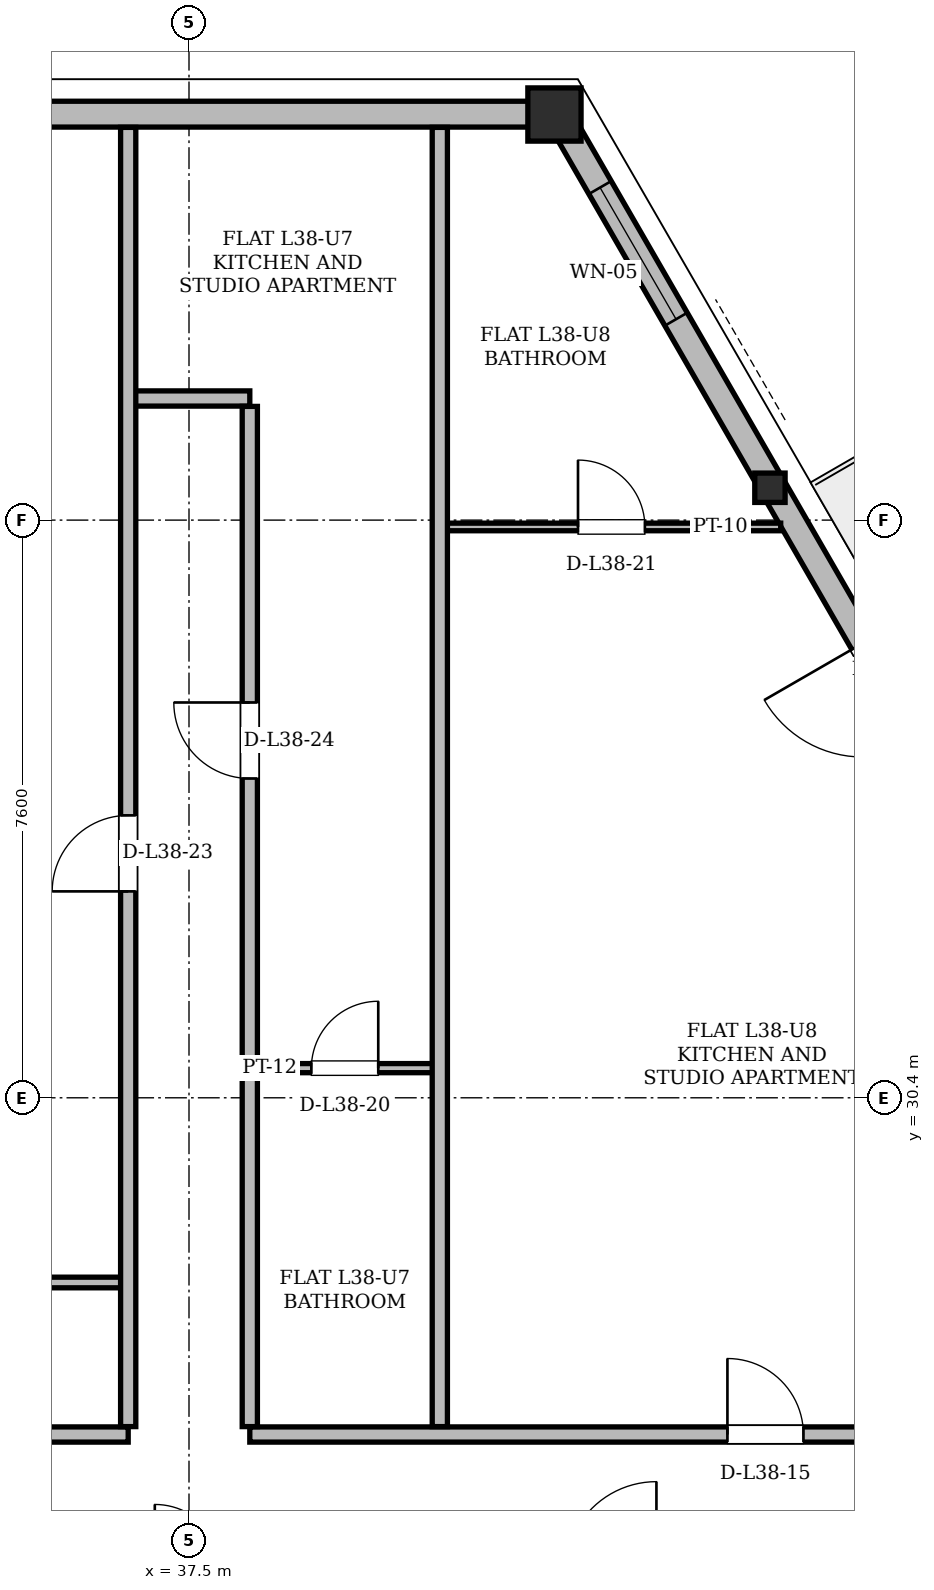
"""IFC4 building model, lengths in metres.
Left out: names, types, materials, properties, quantities, classifications, styles, units other than length and angle.
Written with IfcOpenShell. Run it as: python <this file> out.ifc"""

import sys

from ifc_helpers import new_model, si_unit, direction, frame, frame_2d, origin, origin_2d, place, context, subcontext, project, spatial, rectangle, hollow_rectangle, i_section, extrude, element, fill, save


model = new_model("IFC4")
c1 = context("Model", 3, precision=1e-05, world=origin(), true_north=direction((0.0, 1.0)))
c2 = subcontext(c1, "Body", "Model", "MODEL_VIEW")
j1 = project(units=[si_unit("LENGTHUNIT", "METRE"), si_unit("PLANEANGLEUNIT", "RADIAN")], contexts=[c1])
p1 = place(None, origin())
s1 = spatial("IfcSite", under=j1, at=p1, CompositionType="ELEMENT")
p2 = place(p1, origin())
s2 = spatial("IfcBuilding", under=s1, at=p2, CompositionType="ELEMENT")
p3 = place(p2, frame((0.0, 0.0, 145.8)))
s3 = spatial("IfcBuildingStorey", under=s2, at=p3, CompositionType="ELEMENT", Elevation=145.8)
p4 = place(p3, frame((42.351, 43.341, 0.004), z_axis=(-0.023516425185, -0.002650695324, 0.999719936563), x_axis=(0.11200747743, -0.993707363865, 0.0)))
e1 = element("IfcColumn", 1, at=p4, inside=s3, PredefinedType="COLUMN", context=c2, shape_type="SweptSolid", body=[
    extrude(hollow_rectangle(XDim=0.7, YDim=0.7, WallThickness=0.055, at=origin_2d()), origin(), (0.0, 0.0, 1.0), 3.592),
])
p5 = place(p3, frame((45.183, 38.435, 0.004), z_axis=(-0.022089621745, -0.005233541152, 0.999742296123), x_axis=(0.230540988759, -0.973062614893, 0.0)))
e2 = element("IfcColumn", 2, at=p5, inside=s3, PredefinedType="COLUMN", context=c2, shape_type="SweptSolid", body=[
    extrude(i_section(OverallWidth=0.399, OverallDepth=0.386, WebThickness=0.021, FlangeThickness=0.033, at=origin_2d()), origin(), (0.0, 0.0, 1.0), 3.592),
])
p6 = place(p3, frame((60.052, 12.68, 0.0), z_axis=(0.0, 0.0, 1.0), x_axis=(-0.500002412417, 0.86602401097, 0.0)))
e3 = element("IfcWall", 3, at=p6, inside=s3, PredefinedType="SOLIDWALL", context=c2, shape_type="SweptSolid", body=[
    extrude(rectangle(XDim=35.404, YDim=0.34, at=frame_2d((17.702, 0.0))), origin(), (0.0, 0.0, 1.0), 2.6),
])
p7 = place(p6, frame((6.579, 0.0, 0.0)))
e4 = element("IfcOpeningElement", 4, at=p7, cuts=e3, PredefinedType="OPENING", context=c2, shape_type="SweptSolid", body=[
    extrude(rectangle(XDim=1.5, YDim=2.2, at=frame_2d((0.75, 1.1))), frame((0.0, 0.17, 0.0), z_axis=(0.0, -1.0, 0.0), x_axis=(1.0, 0.0, 0.0)), (0.0, 0.0, 1.0), 0.34),
])
p8 = place(p6, frame((25.869, 0.0, 0.0)))
e5 = element("IfcOpeningElement", 5, at=p8, cuts=e3, PredefinedType="OPENING", context=c2, shape_type="SweptSolid", body=[
    extrude(rectangle(XDim=1.5, YDim=2.2, at=frame_2d((0.75, 1.1))), frame((0.0, 0.17, 0.0), z_axis=(0.0, -1.0, 0.0), x_axis=(1.0, 0.0, 0.0)), (0.0, 0.0, 1.0), 0.34),
])
p9 = place(p6, frame((3.702, 0.0, 0.85)))
e6 = element("IfcOpeningElement", 6, at=p9, cuts=e3, PredefinedType="OPENING", context=c2, shape_type="SweptSolid", body=[
    extrude(rectangle(XDim=1.2, YDim=1.48, at=frame_2d((0.6, 0.74))), frame((0.0, 0.17, 0.0), z_axis=(0.0, -1.0, 0.0), x_axis=(1.0, 0.0, 0.0)), (0.0, 0.0, 1.0), 0.34),
])
p10 = place(p6, frame((11.88, 0.0, 0.85)))
e7 = element("IfcOpeningElement", 7, at=p10, cuts=e3, PredefinedType="OPENING", context=c2, shape_type="SweptSolid", body=[
    extrude(rectangle(XDim=1.2, YDim=1.48, at=frame_2d((0.6, 0.74))), frame((0.0, 0.17, 0.0), z_axis=(0.0, -1.0, 0.0), x_axis=(1.0, 0.0, 0.0)), (0.0, 0.0, 1.0), 0.34),
])
p11 = place(p6, frame((15.346, 0.0, 0.85)))
e8 = element("IfcOpeningElement", 8, at=p11, cuts=e3, PredefinedType="OPENING", context=c2, shape_type="SweptSolid", body=[
    extrude(rectangle(XDim=2.8, YDim=1.64, at=frame_2d((1.4, 0.82))), frame((0.0, 0.17, 0.0), z_axis=(0.0, -1.0, 0.0), x_axis=(1.0, 0.0, 0.0)), (0.0, 0.0, 1.0), 0.34),
])
p12 = place(p6, frame((32.288, 0.0, 0.85)))
e9 = element("IfcOpeningElement", 9, at=p12, cuts=e3, PredefinedType="OPENING", context=c2, shape_type="SweptSolid", body=[
    extrude(rectangle(XDim=2.0, YDim=1.64, at=frame_2d((1.0, 0.82))), frame((0.0, 0.17, 0.0), z_axis=(0.0, -1.0, 0.0), x_axis=(1.0, 0.0, 0.0)), (0.0, 0.0, 1.0), 0.34),
])
p13 = place(p3, frame((42.351, 43.341, 0.0), z_axis=(0.0, 0.0, 1.0), x_axis=(-1.0, 0.0, 0.0)))
e10 = element("IfcWall", 10, at=p13, inside=s3, PredefinedType="SOLIDWALL", context=c2, shape_type="SweptSolid", body=[
    extrude(rectangle(XDim=9.701, YDim=0.34, at=frame_2d((4.851, 0.0))), origin(), (0.0, 0.0, 1.0), 2.6),
])
p14 = place(p3, frame((27.55, 25.97, 0.0), z_axis=(0.0, 0.0, 1.0), x_axis=(1.0, 0.0, 0.0)))
e11 = element("IfcWall", 11, at=p14, inside=s3, PredefinedType="PARTITIONING", context=c2, shape_type="SweptSolid", body=[
    extrude(rectangle(XDim=9.15, YDim=0.2, at=frame_2d((4.575, 0.0))), origin(), (0.0, 0.0, 1.0), 2.842),
])
p15 = place(p3, frame((38.3, 25.97, 0.0), z_axis=(0.0, 0.0, 1.0), x_axis=(1.0, 0.0, 0.0)))
e12 = element("IfcWall", 12, at=p15, inside=s3, PredefinedType="PARTITIONING", context=c2, shape_type="SweptSolid", body=[
    extrude(rectangle(XDim=11.7, YDim=0.2, at=frame_2d((5.85, 0.0))), origin(), (0.0, 0.0, 1.0), 2.842),
])
p16 = place(p15, frame((6.284, 0.0, 0.0)))
e13 = element("IfcOpeningElement", 13, at=p16, cuts=e12, PredefinedType="OPENING", context=c2, shape_type="SweptSolid", body=[
    extrude(rectangle(XDim=1.0, YDim=2.18, at=frame_2d((0.5, 1.09))), frame((0.0, 0.1, 0.0), z_axis=(0.0, -1.0, 0.0), x_axis=(1.0, 0.0, 0.0)), (0.0, 0.0, 1.0), 0.2),
])
p17 = place(p3, frame((23.976, 27.97, 0.0), z_axis=(0.0, 0.0, 1.0), x_axis=(1.0, 0.0, 0.0)))
e14 = element("IfcWall", 14, at=p17, inside=s3, PredefinedType="PARTITIONING", context=c2, shape_type="SweptSolid", body=[
    extrude(rectangle(XDim=12.774, YDim=0.14, at=frame_2d((6.387, 0.0))), origin(), (0.0, 0.0, 1.0), 2.842),
])
p18 = place(p17, frame((0.533, 0.0, 0.0)))
e15 = element("IfcOpeningElement", 15, at=p18, cuts=e14, PredefinedType="OPENING", context=c2, shape_type="SweptSolid", body=[
    extrude(rectangle(XDim=0.88, YDim=2.08, at=frame_2d((0.44, 1.04))), frame((0.0, 0.07, 0.0), z_axis=(0.0, -1.0, 0.0), x_axis=(1.0, 0.0, 0.0)), (0.0, 0.0, 1.0), 0.14),
])
p19 = place(p17, frame((3.054, 0.0, 0.0)))
e16 = element("IfcOpeningElement", 16, at=p19, cuts=e14, PredefinedType="OPENING", context=c2, shape_type="SweptSolid", body=[
    extrude(rectangle(XDim=0.95, YDim=2.1, at=frame_2d((0.475, 1.05))), frame((0.0, 0.07, 0.0), z_axis=(0.0, -1.0, 0.0), x_axis=(1.0, 0.0, 0.0)), (0.0, 0.0, 1.0), 0.14),
])
p20 = place(p17, frame((6.196, 0.0, 0.0)))
e17 = element("IfcOpeningElement", 17, at=p20, cuts=e14, PredefinedType="OPENING", context=c2, shape_type="SweptSolid", body=[
    extrude(rectangle(XDim=0.95, YDim=2.1, at=frame_2d((0.475, 1.05))), frame((0.0, 0.07, 0.0), z_axis=(0.0, -1.0, 0.0), x_axis=(1.0, 0.0, 0.0)), (0.0, 0.0, 1.0), 0.14),
])
p21 = place(p17, frame((10.061, 0.0, 0.0)))
e18 = element("IfcOpeningElement", 18, at=p21, cuts=e14, PredefinedType="OPENING", context=c2, shape_type="SweptSolid", body=[
    extrude(rectangle(XDim=0.92, YDim=2.12, at=frame_2d((0.46, 1.06))), frame((0.0, 0.07, 0.0), z_axis=(0.0, -1.0, 0.0), x_axis=(1.0, 0.0, 0.0)), (0.0, 0.0, 1.0), 0.14),
])
p22 = place(p3, frame((38.218, 30.79, 0.0), z_axis=(0.0, 0.0, 1.0), x_axis=(1.0, 0.0, 0.0)))
e19 = element("IfcWall", 19, at=p22, inside=s3, PredefinedType="PARTITIONING", context=c2, shape_type="SweptSolid", body=[
    extrude(rectangle(XDim=2.664, YDim=0.12, at=frame_2d((1.332, 0.0))), origin(), (0.0, 0.0, 1.0), 3.38),
])
p23 = place(p22, frame((0.892, 0.0, 0.0)))
e20 = element("IfcOpeningElement", 20, at=p23, cuts=e19, PredefinedType="OPENING", context=c2, shape_type="SweptSolid", body=[
    extrude(rectangle(XDim=0.88, YDim=2.08, at=frame_2d((0.44, 1.04))), frame((0.0, 0.06, 0.0), z_axis=(0.0, -1.0, 0.0), x_axis=(1.0, 0.0, 0.0)), (0.0, 0.0, 1.0), 0.12),
])
p24 = place(p3, frame((40.718, 37.91, 0.0), z_axis=(0.0, 0.0, 1.0), x_axis=(1.0, 0.0, 0.0)))
e21 = element("IfcWall", 21, at=p24, inside=s3, PredefinedType="PARTITIONING", context=c2, shape_type="SweptSolid", body=[
    extrude(rectangle(XDim=4.567, YDim=0.1, at=frame_2d((2.284, 0.0))), origin(), (0.0, 0.0, 1.0), 3.38),
])
p25 = place(p24, frame((1.9, 0.0, 0.0)))
e22 = element("IfcOpeningElement", 22, at=p25, cuts=e21, PredefinedType="OPENING", context=c2, shape_type="SweptSolid", body=[
    extrude(rectangle(XDim=0.88, YDim=2.08, at=frame_2d((0.44, 1.04))), frame((0.0, 0.05, 0.0), z_axis=(0.0, -1.0, 0.0), x_axis=(1.0, 0.0, 0.0)), (0.0, 0.0, 1.0), 0.1),
])
p26 = place(p3, frame((36.7, 39.6, 0.0), z_axis=(0.0, 0.0, 1.0), x_axis=(1.0, 0.0, 0.0)))
e23 = element("IfcWall", 23, at=p26, inside=s3, PredefinedType="PARTITIONING", context=c2, shape_type="SweptSolid", body=[
    extrude(rectangle(XDim=1.6, YDim=0.2, at=frame_2d((0.8, 0.0))), origin(), (0.0, 0.0, 1.0), 3.38),
])
p27 = place(p3, frame((36.7, 26.074, 0.0), z_axis=(0.0, 0.0, 1.0), x_axis=(0.0, 1.0, 0.0)))
e24 = element("IfcWall", 24, at=p27, inside=s3, PredefinedType="PARTITIONING", context=c2, shape_type="SweptSolid", body=[
    extrude(rectangle(XDim=17.093, YDim=0.2, at=frame_2d((8.546, 0.0))), origin(), (0.0, 0.0, 1.0), 3.38),
])
p28 = place(p27, frame((7.042, 0.0, 0.0)))
e25 = element("IfcOpeningElement", 25, at=p28, cuts=e24, PredefinedType="OPENING", context=c2, shape_type="SweptSolid", body=[
    extrude(rectangle(XDim=1.0, YDim=2.18, at=frame_2d((0.5, 1.09))), frame((0.0, 0.1, 0.0), z_axis=(0.0, -1.0, 0.0), x_axis=(1.0, 0.0, 0.0)), (0.0, 0.0, 1.0), 0.2),
])
p29 = place(p3, frame((38.3, 26.074, 0.0), z_axis=(0.0, 0.0, 1.0), x_axis=(0.0, 1.0, 0.0)))
e26 = element("IfcWall", 26, at=p29, inside=s3, PredefinedType="PARTITIONING", context=c2, shape_type="SweptSolid", body=[
    extrude(rectangle(XDim=13.422, YDim=0.2, at=frame_2d((6.711, 0.0))), origin(), (0.0, 0.0, 1.0), 3.38),
])
p30 = place(p29, frame((8.527, 0.0, 0.0)))
e27 = element("IfcOpeningElement", 27, at=p30, cuts=e26, PredefinedType="OPENING", context=c2, shape_type="SweptSolid", body=[
    extrude(rectangle(XDim=1.0, YDim=2.18, at=frame_2d((0.5, 1.09))), frame((0.0, 0.1, 0.0), z_axis=(0.0, -1.0, 0.0), x_axis=(1.0, 0.0, 0.0)), (0.0, 0.0, 1.0), 0.2),
])
p31 = place(p3, frame((40.8, 26.074, 0.0), z_axis=(0.0, 0.0, 1.0), x_axis=(0.0, 1.0, 0.0)))
e28 = element("IfcWall", 28, at=p31, inside=s3, PredefinedType="PARTITIONING", context=c2, shape_type="SweptSolid", body=[
    extrude(rectangle(XDim=17.093, YDim=0.2, at=frame_2d((8.546, 0.0))), origin(), (0.0, 0.0, 1.0), 3.38),
])
p32 = place(p12, origin())
e29 = element("IfcWindow", 29, at=p32, inside=s3, PartitioningType="SINGLE_PANEL", PredefinedType="WINDOW", context=c2, shape_type="SweptSolid", body=[
    extrude(rectangle(XDim=2.0, YDim=1.64, at=frame_2d((1.0, 0.82))), frame((0.0, 0.03, 0.0), z_axis=(0.0, -1.0, 0.0), x_axis=(1.0, 0.0, 0.0)), (0.0, 0.0, 1.0), 0.06),
])
fill(e9, e29)
p33 = place(p16, origin())
e30 = element("IfcDoor", 30, at=p33, inside=s3, OperationType="SINGLE_SWING_LEFT", PredefinedType="DOOR", context=c2, shape_type="SweptSolid", body=[
    extrude(rectangle(XDim=1.0, YDim=2.18, at=frame_2d((0.5, 1.09))), frame((0.0, 0.025, 0.0), z_axis=(0.0, -1.0, 0.0), x_axis=(1.0, 0.0, 0.0)), (0.0, 0.0, 1.0), 0.05),
])
fill(e13, e30)
p34 = place(p23, origin())
e31 = element("IfcDoor", 31, at=p34, inside=s3, OperationType="SINGLE_SWING_RIGHT", PredefinedType="DOOR", context=c2, shape_type="SweptSolid", body=[
    extrude(rectangle(XDim=0.88, YDim=2.08, at=frame_2d((0.44, 1.04))), frame((0.0, 0.025, 0.0), z_axis=(0.0, -1.0, 0.0), x_axis=(1.0, 0.0, 0.0)), (0.0, 0.0, 1.0), 0.05),
])
fill(e20, e31)
p35 = place(p25, origin())
e32 = element("IfcDoor", 32, at=p35, inside=s3, OperationType="SINGLE_SWING_LEFT", PredefinedType="DOOR", context=c2, shape_type="SweptSolid", body=[
    extrude(rectangle(XDim=0.88, YDim=2.08, at=frame_2d((0.44, 1.04))), frame((0.0, 0.025, 0.0), z_axis=(0.0, -1.0, 0.0), x_axis=(1.0, 0.0, 0.0)), (0.0, 0.0, 1.0), 0.05),
])
fill(e22, e32)
p36 = place(p28, origin())
e33 = element("IfcDoor", 33, at=p36, inside=s3, OperationType="SINGLE_SWING_LEFT", PredefinedType="DOOR", context=c2, shape_type="SweptSolid", body=[
    extrude(rectangle(XDim=1.0, YDim=2.18, at=frame_2d((0.5, 1.09))), frame((0.0, 0.025, 0.0), z_axis=(0.0, -1.0, 0.0), x_axis=(1.0, 0.0, 0.0)), (0.0, 0.0, 1.0), 0.05),
])
fill(e25, e33)
p37 = place(p30, origin())
e34 = element("IfcDoor", 34, at=p37, inside=s3, OperationType="SINGLE_SWING_RIGHT", PredefinedType="DOOR", context=c2, shape_type="SweptSolid", body=[
    extrude(rectangle(XDim=1.0, YDim=2.18, at=frame_2d((0.5, 1.09))), frame((0.0, 0.025, 0.0), z_axis=(0.0, -1.0, 0.0), x_axis=(1.0, 0.0, 0.0)), (0.0, 0.0, 1.0), 0.05),
])
fill(e27, e34)
save(model, sys.argv[1])
